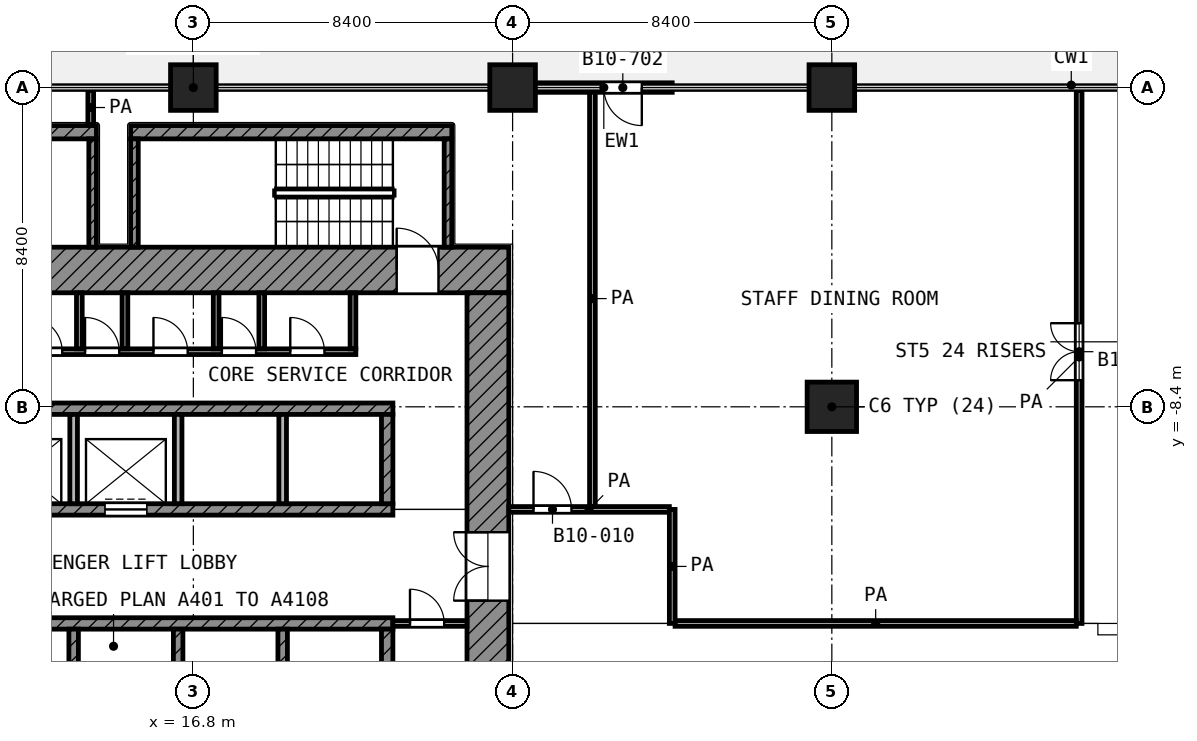
"""IFC4 building model, lengths in metres.
Left out: names, types, materials, properties, quantities, classifications, styles, units other than length and angle.
Written with IfcOpenShell. Run it as: python <this file> out.ifc"""

import sys

from ifc_helpers import new_model, si_unit, direction, frame, frame_2d, origin, origin_2d, place, context, subcontext, project, spatial, rectangle, extrude, element, fill, save


model = new_model("IFC4")
c1 = context("Model", 3, precision=1e-05, world=origin(), true_north=direction((0.0, 1.0)))
c2 = subcontext(c1, "Body", "Model", "MODEL_VIEW")
j1 = project(units=[si_unit("LENGTHUNIT", "METRE"), si_unit("PLANEANGLEUNIT", "RADIAN")], contexts=[c1])
p1 = place(None, origin())
s1 = spatial("IfcSite", under=j1, at=p1, CompositionType="ELEMENT")
p2 = place(p1, origin())
s2 = spatial("IfcBuilding", under=s1, at=p2, CompositionType="ELEMENT")
p3 = place(p2, frame((0.0, 0.0, 47.6)))
s3 = spatial("IfcBuildingStorey", under=s2, at=p3, CompositionType="ELEMENT", Elevation=47.6)
for number, where, z_axis, x_axis in (
    (1, (16.8, 0.0, 0.0), (0.0, 0.0, 1.0), (1.0, 0.0, 0.0)),
    (2, (25.2, 0.0, 0.0), (0.0, 0.0, 1.0), (1.0, 0.0, 0.0)),
    (3, (33.6, 0.0, 0.0), (0.0, 0.0, 1.0), (1.0, 0.0, 0.0)),
):
    element("IfcColumn", number, at=place(p3, frame(where, z_axis=z_axis, x_axis=x_axis)), inside=s3, PredefinedType="COLUMN", context=c2, shape_type="SweptSolid", body=[
        extrude(rectangle(XDim=1.2, YDim=1.2, at=origin_2d()), origin(), (0.0, 0.0, 1.0), 4.2),
    ])
p4 = place(p3, frame((33.6, -8.4, 0.0), z_axis=(0.0, 0.0, 1.0), x_axis=(1.0, 0.0, 0.0)))
e4 = element("IfcColumn", 4, at=p4, inside=s3, PredefinedType="COLUMN", context=c2, shape_type="SweptSolid", body=[
    extrude(rectangle(XDim=1.3, YDim=1.3, at=origin_2d()), origin(), (0.0, 0.0, 1.0), 4.2),
])
p5 = place(p3, frame((29.4, 0.0, 0.0), z_axis=(0.0, 0.0, 1.0), x_axis=(-1.0, 0.0, 0.0)))
e5 = element("IfcWall", 5, at=p5, inside=s3, PredefinedType="SOLIDWALL", context=c2, shape_type="SweptSolid", body=[
    extrude(rectangle(XDim=3.6, YDim=0.25, at=frame_2d((1.8, 0.0))), origin(), (0.0, 0.0, 1.0), 3.66),
])
p6 = place(p5, frame((0.8, 0.0, 0.0)))
e6 = element("IfcOpeningElement", 6, at=p6, cuts=e5, PredefinedType="OPENING", context=c2, shape_type="SweptSolid", body=[
    extrude(rectangle(XDim=1.0, YDim=2.1, at=frame_2d((0.5, 1.05))), frame((0.0, 0.135, 0.0), z_axis=(0.0, -1.0, 0.0), x_axis=(1.0, 0.0, 0.0)), (0.0, 0.0, 1.0), 0.27),
])
p7 = place(p3, frame((4.2, -4.8, 0.0), z_axis=(0.0, 0.0, 1.0), x_axis=(1.0, 0.0, 0.0)))
e7 = element("IfcWall", 7, at=p7, inside=s3, PredefinedType="SHEAR", context=c2, shape_type="SweptSolid", body=[
    extrude(rectangle(XDim=20.9, YDim=1.2, at=frame_2d((10.45, 0.0))), origin(), (0.0, 0.0, 1.0), 3.78),
])
p8 = place(p7, frame((1.95, 0.0, 0.0)))
e8 = element("IfcOpeningElement", 8, at=p8, cuts=e7, PredefinedType="OPENING", context=c2, shape_type="SweptSolid", body=[
    extrude(rectangle(XDim=1.1, YDim=2.1, at=frame_2d((0.55, 1.05))), frame((0.0, 0.61, 0.0), z_axis=(0.0, -1.0, 0.0), x_axis=(1.0, 0.0, 0.0)), (0.0, 0.0, 1.0), 1.22),
])
p9 = place(p7, frame((17.95, 0.0, 0.0)))
e9 = element("IfcOpeningElement", 9, at=p9, cuts=e7, PredefinedType="OPENING", context=c2, shape_type="SweptSolid", body=[
    extrude(rectangle(XDim=1.1, YDim=2.1, at=frame_2d((0.55, 1.05))), frame((0.0, 0.61, 0.0), z_axis=(0.0, -1.0, 0.0), x_axis=(1.0, 0.0, 0.0)), (0.0, 0.0, 1.0), 1.22),
])
p10 = place(p3, frame((24.55, -24.0, 0.0), z_axis=(0.0, 0.0, 1.0), x_axis=(0.0, 1.0, 0.0)))
e10 = element("IfcWall", 10, at=p10, inside=s3, PredefinedType="SHEAR", context=c2, shape_type="SweptSolid", body=[
    extrude(rectangle(XDim=18.6, YDim=1.1, at=frame_2d((9.3, 0.0))), origin(), (0.0, 0.0, 1.0), 3.78),
])
p11 = place(p10, frame((10.5, 0.0, 0.0)))
e11 = element("IfcOpeningElement", 11, at=p11, cuts=e10, PredefinedType="OPENING", context=c2, shape_type="SweptSolid", body=[
    extrude(rectangle(XDim=1.8, YDim=2.1, at=frame_2d((0.9, 1.05))), frame((0.0, 0.56, 0.0), z_axis=(0.0, -1.0, 0.0), x_axis=(1.0, 0.0, 0.0)), (0.0, 0.0, 1.0), 1.12),
])
p12 = place(p3, frame((5.4, -8.45, 0.0), z_axis=(0.0, 0.0, 1.0), x_axis=(1.0, 0.0, 0.0)))
e12 = element("IfcWall", 12, at=p12, inside=s3, PredefinedType="SHEAR", context=c2, shape_type="SweptSolid", body=[
    extrude(rectangle(XDim=16.65, YDim=0.3, at=frame_2d((8.325, 0.0))), origin(), (0.0, 0.0, 1.0), 3.78),
])
p13 = place(p3, frame((5.4, -11.1, 0.0), z_axis=(0.0, 0.0, 1.0), x_axis=(1.0, 0.0, 0.0)))
e13 = element("IfcWall", 13, at=p13, inside=s3, PredefinedType="SHEAR", context=c2, shape_type="SweptSolid", body=[
    extrude(rectangle(XDim=16.65, YDim=0.3, at=frame_2d((8.325, 0.0))), origin(), (0.0, 0.0, 1.0), 3.78),
])
p14 = place(p13, frame((0.825, 0.0, 0.0)))
e14 = element("IfcOpeningElement", 14, at=p14, cuts=e13, PredefinedType="OPENING", context=c2, shape_type="SweptSolid", body=[
    extrude(rectangle(XDim=1.1, YDim=2.1, at=frame_2d((0.55, 1.05))), frame((0.0, 0.16, 0.0), z_axis=(0.0, -1.0, 0.0), x_axis=(1.0, 0.0, 0.0)), (0.0, 0.0, 1.0), 0.32),
])
p15 = place(p13, frame((3.575, 0.0, 0.0)))
e15 = element("IfcOpeningElement", 15, at=p15, cuts=e13, PredefinedType="OPENING", context=c2, shape_type="SweptSolid", body=[
    extrude(rectangle(XDim=1.1, YDim=2.1, at=frame_2d((0.55, 1.05))), frame((0.0, 0.16, 0.0), z_axis=(0.0, -1.0, 0.0), x_axis=(1.0, 0.0, 0.0)), (0.0, 0.0, 1.0), 0.32),
])
p16 = place(p13, frame((6.325, 0.0, 0.0)))
e16 = element("IfcOpeningElement", 16, at=p16, cuts=e13, PredefinedType="OPENING", context=c2, shape_type="SweptSolid", body=[
    extrude(rectangle(XDim=1.1, YDim=2.1, at=frame_2d((0.55, 1.05))), frame((0.0, 0.16, 0.0), z_axis=(0.0, -1.0, 0.0), x_axis=(1.0, 0.0, 0.0)), (0.0, 0.0, 1.0), 0.32),
])
p17 = place(p13, frame((9.075, 0.0, 0.0)))
e17 = element("IfcOpeningElement", 17, at=p17, cuts=e13, PredefinedType="OPENING", context=c2, shape_type="SweptSolid", body=[
    extrude(rectangle(XDim=1.1, YDim=2.1, at=frame_2d((0.55, 1.05))), frame((0.0, 0.16, 0.0), z_axis=(0.0, -1.0, 0.0), x_axis=(1.0, 0.0, 0.0)), (0.0, 0.0, 1.0), 0.32),
])
p18 = place(p3, frame((5.4, -14.1, 0.0), z_axis=(0.0, 0.0, 1.0), x_axis=(1.0, 0.0, 0.0)))
e18 = element("IfcWall", 18, at=p18, inside=s3, PredefinedType="SHEAR", context=c2, shape_type="SweptSolid", body=[
    extrude(rectangle(XDim=16.65, YDim=0.3, at=frame_2d((8.325, 0.0))), origin(), (0.0, 0.0, 1.0), 3.78),
])
p19 = place(p3, frame((21.9, -10.95, 0.0), z_axis=(0.0, 0.0, 1.0), x_axis=(0.0, 1.0, 0.0)))
e19 = element("IfcWall", 19, at=p19, inside=s3, PredefinedType="SHEAR", context=c2, shape_type="SweptSolid", body=[
    extrude(rectangle(XDim=2.35, YDim=0.3, at=frame_2d((1.175, 0.0))), origin(), (0.0, 0.0, 1.0), 3.78),
])
p20 = place(p3, frame((21.9, -16.6, 0.0), z_axis=(0.0, 0.0, 1.0), x_axis=(0.0, 1.0, 0.0)))
e20 = element("IfcWall", 20, at=p20, inside=s3, PredefinedType="SHEAR", context=c2, shape_type="SweptSolid", body=[
    extrude(rectangle(XDim=2.35, YDim=0.3, at=frame_2d((1.175, 0.0))), origin(), (0.0, 0.0, 1.0), 3.78),
])
for number, where, z_axis, x_axis in (
    (21, (13.65, -10.95, 0.0), (0.0, 0.0, 1.0), (0.0, 1.0, 0.0)),
    (22, (16.4, -10.95, 0.0), (0.0, 0.0, 1.0), (0.0, 1.0, 0.0)),
    (23, (19.15, -10.95, 0.0), (0.0, 0.0, 1.0), (0.0, 1.0, 0.0)),
):
    element("IfcWall", number, at=place(p3, frame(where, z_axis=z_axis, x_axis=x_axis)), inside=s3, PredefinedType="PARTITIONING", context=c2, shape_type="SweptSolid", body=[
        extrude(rectangle(XDim=2.35, YDim=0.2, at=frame_2d((1.175, 0.0))), origin(), (0.0, 0.0, 1.0), 3.78),
    ])
for number, where, z_axis, x_axis in (
    (24, (13.65, -16.6, 0.0), (0.0, 0.0, 1.0), (0.0, 1.0, 0.0)),
    (25, (16.4, -16.6, 0.0), (0.0, 0.0, 1.0), (0.0, 1.0, 0.0)),
    (26, (19.15, -16.6, 0.0), (0.0, 0.0, 1.0), (0.0, 1.0, 0.0)),
):
    element("IfcWall", number, at=place(p3, frame(where, z_axis=z_axis, x_axis=x_axis)), inside=s3, PredefinedType="SHEAR", context=c2, shape_type="SweptSolid", body=[
        extrude(rectangle(XDim=2.35, YDim=0.25, at=frame_2d((1.175, 0.0))), origin(), (0.0, 0.0, 1.0), 3.78),
    ])
p21 = place(p3, frame((22.05, -14.1, 0.0), z_axis=(0.0, 0.0, 1.0), x_axis=(1.0, 0.0, 0.0)))
e27 = element("IfcWall", 27, at=p21, inside=s3, PredefinedType="PARTITIONING", context=c2, shape_type="SweptSolid", body=[
    extrude(rectangle(XDim=1.95, YDim=0.15, at=frame_2d((0.975, 0.0))), origin(), (0.0, 0.0, 1.0), 3.78),
])
p22 = place(p21, frame((0.45, 0.0, 0.0)))
e28 = element("IfcOpeningElement", 28, at=p22, cuts=e27, PredefinedType="OPENING", context=c2, shape_type="SweptSolid", body=[
    extrude(rectangle(XDim=0.9, YDim=2.1, at=frame_2d((0.45, 1.05))), frame((0.0, 0.085, 0.0), z_axis=(0.0, -1.0, 0.0), x_axis=(1.0, 0.0, 0.0)), (0.0, 0.0, 1.0), 0.17),
])
p23 = place(p3, frame((8.325, -6.95, 0.0), z_axis=(0.0, 0.0, 1.0), x_axis=(1.0, 0.0, 0.0)))
e29 = element("IfcWall", 29, at=p23, inside=s3, PredefinedType="PARTITIONING", context=c2, shape_type="SweptSolid", body=[
    extrude(rectangle(XDim=12.75, YDim=0.15, at=frame_2d((6.375, 0.0))), origin(), (0.0, 0.0, 1.0), 3.78),
])
p24 = place(p23, frame((0.225, 0.0, 0.0)))
e30 = element("IfcOpeningElement", 30, at=p24, cuts=e29, PredefinedType="OPENING", context=c2, shape_type="SweptSolid", body=[
    extrude(rectangle(XDim=0.9, YDim=2.1, at=frame_2d((0.45, 1.05))), frame((0.0, 0.085, 0.0), z_axis=(0.0, -1.0, 0.0), x_axis=(1.0, 0.0, 0.0)), (0.0, 0.0, 1.0), 0.17),
])
p25 = place(p23, frame((2.025, 0.0, 0.0)))
e31 = element("IfcOpeningElement", 31, at=p25, cuts=e29, PredefinedType="OPENING", context=c2, shape_type="SweptSolid", body=[
    extrude(rectangle(XDim=0.9, YDim=2.1, at=frame_2d((0.45, 1.05))), frame((0.0, 0.085, 0.0), z_axis=(0.0, -1.0, 0.0), x_axis=(1.0, 0.0, 0.0)), (0.0, 0.0, 1.0), 0.17),
])
p26 = place(p23, frame((4.125, 0.0, 0.0)))
e32 = element("IfcOpeningElement", 32, at=p26, cuts=e29, PredefinedType="OPENING", context=c2, shape_type="SweptSolid", body=[
    extrude(rectangle(XDim=0.9, YDim=2.1, at=frame_2d((0.45, 1.05))), frame((0.0, 0.085, 0.0), z_axis=(0.0, -1.0, 0.0), x_axis=(1.0, 0.0, 0.0)), (0.0, 0.0, 1.0), 0.17),
])
p27 = place(p23, frame((5.625, 0.0, 0.0)))
e33 = element("IfcOpeningElement", 33, at=p27, cuts=e29, PredefinedType="OPENING", context=c2, shape_type="SweptSolid", body=[
    extrude(rectangle(XDim=0.9, YDim=2.1, at=frame_2d((0.45, 1.05))), frame((0.0, 0.085, 0.0), z_axis=(0.0, -1.0, 0.0), x_axis=(1.0, 0.0, 0.0)), (0.0, 0.0, 1.0), 0.17),
])
p28 = place(p23, frame((7.425, 0.0, 0.0)))
e34 = element("IfcOpeningElement", 34, at=p28, cuts=e29, PredefinedType="OPENING", context=c2, shape_type="SweptSolid", body=[
    extrude(rectangle(XDim=0.9, YDim=2.1, at=frame_2d((0.45, 1.05))), frame((0.0, 0.085, 0.0), z_axis=(0.0, -1.0, 0.0), x_axis=(1.0, 0.0, 0.0)), (0.0, 0.0, 1.0), 0.17),
])
p29 = place(p23, frame((9.225, 0.0, 0.0)))
e35 = element("IfcOpeningElement", 35, at=p29, cuts=e29, PredefinedType="OPENING", context=c2, shape_type="SweptSolid", body=[
    extrude(rectangle(XDim=0.9, YDim=2.1, at=frame_2d((0.45, 1.05))), frame((0.0, 0.085, 0.0), z_axis=(0.0, -1.0, 0.0), x_axis=(1.0, 0.0, 0.0)), (0.0, 0.0, 1.0), 0.17),
])
p30 = place(p23, frame((11.025, 0.0, 0.0)))
e36 = element("IfcOpeningElement", 36, at=p30, cuts=e29, PredefinedType="OPENING", context=c2, shape_type="SweptSolid", body=[
    extrude(rectangle(XDim=0.9, YDim=2.1, at=frame_2d((0.45, 1.05))), frame((0.0, 0.085, 0.0), z_axis=(0.0, -1.0, 0.0), x_axis=(1.0, 0.0, 0.0)), (0.0, 0.0, 1.0), 0.17),
])
for number, where, z_axis, x_axis in (
    (37, (13.8, -6.875, 0.0), (0.0, 0.0, 1.0), (0.0, 1.0, 0.0)),
    (38, (15.0, -6.875, 0.0), (0.0, 0.0, 1.0), (0.0, 1.0, 0.0)),
    (39, (17.4, -6.875, 0.0), (0.0, 0.0, 1.0), (0.0, 1.0, 0.0)),
    (40, (18.6, -6.875, 0.0), (0.0, 0.0, 1.0), (0.0, 1.0, 0.0)),
    (41, (21.0, -6.875, 0.0), (0.0, 0.0, 1.0), (0.0, 1.0, 0.0)),
):
    element("IfcWall", number, at=place(p3, frame(where, z_axis=z_axis, x_axis=x_axis)), inside=s3, PredefinedType="PARTITIONING", context=c2, shape_type="SweptSolid", body=[
        extrude(rectangle(XDim=1.475, YDim=0.15, at=frame_2d((0.738, 0.0))), origin(), (0.0, 0.0, 1.0), 3.78),
    ])
p31 = place(p3, frame((5.8, -1.175, 0.0), z_axis=(0.0, 0.0, 1.0), x_axis=(1.0, 0.0, 0.0)))
e42 = element("IfcWall", 42, at=p31, inside=s3, PredefinedType="SHEAR", context=c2, shape_type="SweptSolid", body=[
    extrude(rectangle(XDim=8.45, YDim=0.35, at=frame_2d((4.225, 0.0))), origin(), (0.0, 0.0, 1.0), 3.78),
])
p32 = place(p3, frame((14.15, -4.2, 0.0), z_axis=(0.0, 0.0, 1.0), x_axis=(0.0, 1.0, 0.0)))
e43 = element("IfcWall", 43, at=p32, inside=s3, PredefinedType="SHEAR", context=c2, shape_type="SweptSolid", body=[
    extrude(rectangle(XDim=2.85, YDim=0.2, at=frame_2d((1.425, 0.0))), origin(), (0.0, 0.0, 1.0), 3.78),
])
p33 = place(p3, frame((15.15, -1.175, 0.0), z_axis=(0.0, 0.0, 1.0), x_axis=(1.0, 0.0, 0.0)))
e44 = element("IfcWall", 44, at=p33, inside=s3, PredefinedType="SHEAR", context=c2, shape_type="SweptSolid", body=[
    extrude(rectangle(XDim=8.45, YDim=0.35, at=frame_2d((4.225, 0.0))), origin(), (0.0, 0.0, 1.0), 3.78),
])
for number, where, z_axis, x_axis in (
    (45, (15.25, -4.2, 0.0), (0.0, 0.0, 1.0), (0.0, 1.0, 0.0)),
    (46, (23.5, -4.2, 0.0), (0.0, 0.0, 1.0), (0.0, 1.0, 0.0)),
):
    element("IfcWall", number, at=place(p3, frame(where, z_axis=z_axis, x_axis=x_axis)), inside=s3, PredefinedType="SHEAR", context=c2, shape_type="SweptSolid", body=[
        extrude(rectangle(XDim=2.85, YDim=0.2, at=frame_2d((1.425, 0.0))), origin(), (0.0, 0.0, 1.0), 3.78),
    ])
p34 = place(p3, frame((29.475, -14.1, 0.0), z_axis=(0.0, 0.0, 1.0), x_axis=(1.0, 0.0, 0.0)))
e47 = element("IfcWall", 47, at=p34, inside=s3, PredefinedType="PARTITIONING", context=c2, shape_type="SweptSolid", body=[
    extrude(rectangle(XDim=10.557, YDim=0.15, at=frame_2d((5.278, 0.0))), origin(), (0.0, 0.0, 1.0), 3.78),
])
p35 = place(p3, frame((25.1, -11.1, 0.0), z_axis=(0.0, 0.0, 1.0), x_axis=(1.0, 0.0, 0.0)))
e48 = element("IfcWall", 48, at=p35, inside=s3, PredefinedType="PARTITIONING", context=c2, shape_type="SweptSolid", body=[
    extrude(rectangle(XDim=4.225, YDim=0.15, at=frame_2d((2.112, 0.0))), origin(), (0.0, 0.0, 1.0), 3.78),
])
p36 = place(p35, frame((0.65, 0.0, 0.0)))
e49 = element("IfcOpeningElement", 49, at=p36, cuts=e48, PredefinedType="OPENING", context=c2, shape_type="SweptSolid", body=[
    extrude(rectangle(XDim=1.0, YDim=2.1, at=frame_2d((0.5, 1.05))), frame((0.0, 0.085, 0.0), z_axis=(0.0, -1.0, 0.0), x_axis=(1.0, 0.0, 0.0)), (0.0, 0.0, 1.0), 0.17),
])
p37 = place(p3, frame((14.1, -0.97, 0.0), z_axis=(0.0, 0.0, 1.0), x_axis=(0.0, 1.0, 0.0)))
e50 = element("IfcWall", 50, at=p37, inside=s3, PredefinedType="PARTITIONING", context=c2, shape_type="SweptSolid", body=[
    extrude(rectangle(XDim=0.89, YDim=0.15, at=frame_2d((0.445, 0.0))), origin(), (0.0, 0.0, 1.0), 3.78),
])
p38 = place(p3, frame((27.3, -11.025, 0.0), z_axis=(0.0, 0.0, 1.0), x_axis=(0.0, 1.0, 0.0)))
e51 = element("IfcWall", 51, at=p38, inside=s3, PredefinedType="PARTITIONING", context=c2, shape_type="SweptSolid", body=[
    extrude(rectangle(XDim=10.945, YDim=0.15, at=frame_2d((5.472, 0.0))), origin(), (0.0, 0.0, 1.0), 3.78),
])
p39 = place(p3, frame((29.4, -14.1, 0.0), z_axis=(0.0, 0.0, 1.0), x_axis=(0.0, 1.0, 0.0)))
e52 = element("IfcWall", 52, at=p39, inside=s3, PredefinedType="PARTITIONING", context=c2, shape_type="SweptSolid", body=[
    extrude(rectangle(XDim=3.0, YDim=0.15, at=frame_2d((1.5, 0.0))), origin(), (0.0, 0.0, 1.0), 3.78),
])
p40 = place(p3, frame((40.107, -14.1, 0.0), z_axis=(0.0, 0.0, 1.0), x_axis=(0.0, 1.0, 0.0)))
e53 = element("IfcWall", 53, at=p40, inside=s3, PredefinedType="PARTITIONING", context=c2, shape_type="SweptSolid", body=[
    extrude(rectangle(XDim=14.02, YDim=0.15, at=frame_2d((7.01, 0.0))), origin(), (0.0, 0.0, 1.0), 3.78),
])
p41 = place(p40, frame((6.4, 0.0, 0.0)))
e54 = element("IfcOpeningElement", 54, at=p41, cuts=e53, PredefinedType="OPENING", context=c2, shape_type="SweptSolid", body=[
    extrude(rectangle(XDim=1.5, YDim=2.1, at=frame_2d((0.75, 1.05))), frame((0.0, 0.085, 0.0), z_axis=(0.0, -1.0, 0.0), x_axis=(1.0, 0.0, 0.0)), (0.0, 0.0, 1.0), 0.17),
])
p42 = place(p6, origin())
e55 = element("IfcDoor", 55, at=p42, inside=s3, OperationType="SINGLE_SWING_LEFT", PredefinedType="DOOR", context=c2, shape_type="SweptSolid", body=[
    extrude(rectangle(XDim=1.0, YDim=2.1, at=frame_2d((0.5, 1.05))), frame((0.0, 0.025, 0.0), z_axis=(0.0, -1.0, 0.0), x_axis=(1.0, 0.0, 0.0)), (0.0, 0.0, 1.0), 0.05),
])
fill(e6, e55)
p43 = place(p17, origin())
e56 = element("IfcDoor", 56, at=p43, inside=s3, OperationType="DOUBLE_DOOR_SLIDING", PredefinedType="DOOR", context=c2, shape_type="SweptSolid", body=[
    extrude(rectangle(XDim=1.1, YDim=2.1, at=frame_2d((0.55, 1.05))), frame((0.0, 0.025, 0.0), z_axis=(0.0, -1.0, 0.0), x_axis=(1.0, 0.0, 0.0)), (0.0, 0.0, 1.0), 0.05),
])
fill(e17, e56)
p44 = place(p9, origin())
e57 = element("IfcDoor", 57, at=p44, inside=s3, OperationType="SINGLE_SWING_LEFT", PredefinedType="DOOR", context=c2, shape_type="SweptSolid", body=[
    extrude(rectangle(XDim=1.1, YDim=2.1, at=frame_2d((0.55, 1.05))), frame((0.0, 0.025, 0.0), z_axis=(0.0, -1.0, 0.0), x_axis=(1.0, 0.0, 0.0)), (0.0, 0.0, 1.0), 0.05),
])
fill(e9, e57)
p45 = place(p11, origin())
e58 = element("IfcDoor", 58, at=p45, inside=s3, OperationType="DOUBLE_DOOR_SINGLE_SWING", PredefinedType="DOOR", context=c2, shape_type="SweptSolid", body=[
    extrude(rectangle(XDim=1.8, YDim=2.1, at=frame_2d((0.9, 1.05))), frame((0.0, 0.025, 0.0), z_axis=(0.0, -1.0, 0.0), x_axis=(1.0, 0.0, 0.0)), (0.0, 0.0, 1.0), 0.05),
])
fill(e11, e58)
p46 = place(p26, origin())
e59 = element("IfcDoor", 59, at=p46, inside=s3, OperationType="SINGLE_SWING_LEFT", PredefinedType="DOOR", context=c2, shape_type="SweptSolid", body=[
    extrude(rectangle(XDim=0.9, YDim=2.1, at=frame_2d((0.45, 1.05))), frame((0.0, 0.025, 0.0), z_axis=(0.0, -1.0, 0.0), x_axis=(1.0, 0.0, 0.0)), (0.0, 0.0, 1.0), 0.05),
])
fill(e32, e59)
p47 = place(p27, origin())
e60 = element("IfcDoor", 60, at=p47, inside=s3, OperationType="SINGLE_SWING_LEFT", PredefinedType="DOOR", context=c2, shape_type="SweptSolid", body=[
    extrude(rectangle(XDim=0.9, YDim=2.1, at=frame_2d((0.45, 1.05))), frame((0.0, 0.025, 0.0), z_axis=(0.0, -1.0, 0.0), x_axis=(1.0, 0.0, 0.0)), (0.0, 0.0, 1.0), 0.05),
])
fill(e33, e60)
p48 = place(p28, origin())
e61 = element("IfcDoor", 61, at=p48, inside=s3, OperationType="SINGLE_SWING_LEFT", PredefinedType="DOOR", context=c2, shape_type="SweptSolid", body=[
    extrude(rectangle(XDim=0.9, YDim=2.1, at=frame_2d((0.45, 1.05))), frame((0.0, 0.025, 0.0), z_axis=(0.0, -1.0, 0.0), x_axis=(1.0, 0.0, 0.0)), (0.0, 0.0, 1.0), 0.05),
])
fill(e34, e61)
p49 = place(p29, origin())
e62 = element("IfcDoor", 62, at=p49, inside=s3, OperationType="SINGLE_SWING_LEFT", PredefinedType="DOOR", context=c2, shape_type="SweptSolid", body=[
    extrude(rectangle(XDim=0.9, YDim=2.1, at=frame_2d((0.45, 1.05))), frame((0.0, 0.025, 0.0), z_axis=(0.0, -1.0, 0.0), x_axis=(1.0, 0.0, 0.0)), (0.0, 0.0, 1.0), 0.05),
])
fill(e35, e62)
p50 = place(p30, origin())
e63 = element("IfcDoor", 63, at=p50, inside=s3, OperationType="SINGLE_SWING_LEFT", PredefinedType="DOOR", context=c2, shape_type="SweptSolid", body=[
    extrude(rectangle(XDim=0.9, YDim=2.1, at=frame_2d((0.45, 1.05))), frame((0.0, 0.025, 0.0), z_axis=(0.0, -1.0, 0.0), x_axis=(1.0, 0.0, 0.0)), (0.0, 0.0, 1.0), 0.05),
])
fill(e36, e63)
p51 = place(p22, origin())
e64 = element("IfcDoor", 64, at=p51, inside=s3, OperationType="SINGLE_SWING_LEFT", PredefinedType="DOOR", context=c2, shape_type="SweptSolid", body=[
    extrude(rectangle(XDim=0.9, YDim=2.1, at=frame_2d((0.45, 1.05))), frame((0.0, 0.025, 0.0), z_axis=(0.0, -1.0, 0.0), x_axis=(1.0, 0.0, 0.0)), (0.0, 0.0, 1.0), 0.05),
])
fill(e28, e64)
p52 = place(p36, origin())
e65 = element("IfcDoor", 65, at=p52, inside=s3, OperationType="SINGLE_SWING_LEFT", PredefinedType="DOOR", context=c2, shape_type="SweptSolid", body=[
    extrude(rectangle(XDim=1.0, YDim=2.1, at=frame_2d((0.5, 1.05))), frame((0.0, 0.025, 0.0), z_axis=(0.0, -1.0, 0.0), x_axis=(1.0, 0.0, 0.0)), (0.0, 0.0, 1.0), 0.05),
])
fill(e49, e65)
p53 = place(p41, origin())
e66 = element("IfcDoor", 66, at=p53, inside=s3, OperationType="DOUBLE_DOOR_SINGLE_SWING", PredefinedType="DOOR", context=c2, shape_type="SweptSolid", body=[
    extrude(rectangle(XDim=1.5, YDim=2.1, at=frame_2d((0.75, 1.05))), frame((0.0, 0.025, 0.0), z_axis=(0.0, -1.0, 0.0), x_axis=(1.0, 0.0, 0.0)), (0.0, 0.0, 1.0), 0.05),
])
fill(e54, e66)
save(model, sys.argv[1])
